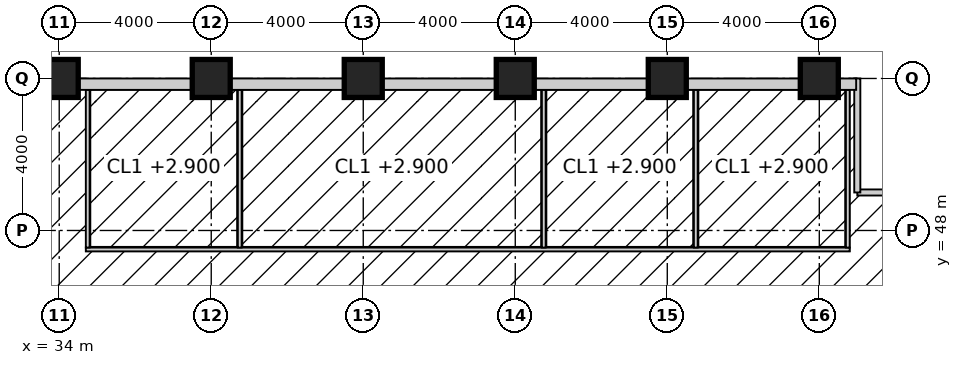
"""IFC4 building model, lengths in metres.
Left out: names, types, materials, properties, quantities, classifications, styles, units other than length and angle.
Written with IfcOpenShell. Run it as: python <this file> out.ifc"""

import sys

from ifc_helpers import new_model, si_unit, direction, frame, frame_2d, origin, origin_2d, place, context, subcontext, project, spatial, rectangle, hollow_rectangle, extrude, element, fill, save


model = new_model("IFC4")
c1 = context("Model", 3, precision=1e-05, world=origin(), true_north=direction((0.0, 1.0)))
c2 = subcontext(c1, "Body", "Model", "MODEL_VIEW")
j1 = project(units=[si_unit("LENGTHUNIT", "METRE"), si_unit("PLANEANGLEUNIT", "RADIAN")], contexts=[c1])
p1 = place(None, origin())
s1 = spatial("IfcSite", under=j1, at=p1, CompositionType="ELEMENT")
p2 = place(p1, origin())
s2 = spatial("IfcBuilding", under=s1, at=p2, CompositionType="ELEMENT")
p3 = place(p2, frame((0.0, 0.0, 113.4)))
s3 = spatial("IfcBuildingStorey", under=s2, at=p3, CompositionType="ELEMENT", Elevation=113.4)
for number, where, z_axis, x_axis in (
    (1, (34.0, 52.0, 0.0), (0.0, 0.0, 1.0), (1.0, 0.0, 0.0)),
    (2, (38.0, 52.0, 0.0), (0.0, 0.0, 1.0), (1.0, 0.0, 0.0)),
    (3, (42.0, 52.0, 0.0), (0.0, 0.0, 1.0), (1.0, 0.0, 0.0)),
    (4, (46.0, 52.0, 0.0), (0.0, 0.0, 1.0), (1.0, 0.0, 0.0)),
    (5, (50.0, 52.0, 0.0), (0.0, 0.0, 1.0), (1.0, 0.0, 0.0)),
    (6, (54.0, 52.0, 0.0), (0.0, 0.0, 1.0), (1.0, 0.0, 0.0)),
):
    element("IfcColumn", number, at=place(p3, frame(where, z_axis=z_axis, x_axis=x_axis)), inside=s3, PredefinedType="COLUMN", context=c2, shape_type="SweptSolid", body=[
        extrude(hollow_rectangle(XDim=1.0, YDim=1.0, WallThickness=0.1, at=origin_2d()), origin(), (0.0, 0.0, 1.0), 4.0),
    ])
p4 = place(p3, frame((34.7, 47.5, 0.0), z_axis=(0.0, 0.0, 1.0), x_axis=(1.0, 0.0, 0.0)))
e7 = element("IfcWall", 7, at=p4, inside=s3, PredefinedType="PARTITIONING", context=c2, shape_type="SweptSolid", body=[
    extrude(rectangle(XDim=20.1, YDim=0.1, at=frame_2d((10.05, 0.0))), origin(), (0.0, 0.0, 1.0), 3.85),
])
p5 = place(p4, frame((1.55, 0.0, 0.0)))
e8 = element("IfcOpeningElement", 8, at=p5, cuts=e7, PredefinedType="OPENING", context=c2, shape_type="SweptSolid", body=[
    extrude(rectangle(XDim=1.0, YDim=2.2, at=frame_2d((0.5, 1.1))), frame((0.0, 0.06, 0.0), z_axis=(0.0, -1.0, 0.0), x_axis=(1.0, 0.0, 0.0)), (0.0, 0.0, 1.0), 0.12),
])
p6 = place(p4, frame((7.55, 0.0, 0.0)))
e9 = element("IfcOpeningElement", 9, at=p6, cuts=e7, PredefinedType="OPENING", context=c2, shape_type="SweptSolid", body=[
    extrude(rectangle(XDim=1.0, YDim=2.2, at=frame_2d((0.5, 1.1))), frame((0.0, 0.06, 0.0), z_axis=(0.0, -1.0, 0.0), x_axis=(1.0, 0.0, 0.0)), (0.0, 0.0, 1.0), 0.12),
])
p7 = place(p4, frame((13.55, 0.0, 0.0)))
e10 = element("IfcOpeningElement", 10, at=p7, cuts=e7, PredefinedType="OPENING", context=c2, shape_type="SweptSolid", body=[
    extrude(rectangle(XDim=1.0, YDim=2.2, at=frame_2d((0.5, 1.1))), frame((0.0, 0.06, 0.0), z_axis=(0.0, -1.0, 0.0), x_axis=(1.0, 0.0, 0.0)), (0.0, 0.0, 1.0), 0.12),
])
p8 = place(p4, frame((17.55, 0.0, 0.0)))
e11 = element("IfcOpeningElement", 11, at=p8, cuts=e7, PredefinedType="OPENING", context=c2, shape_type="SweptSolid", body=[
    extrude(rectangle(XDim=1.0, YDim=2.2, at=frame_2d((0.5, 1.1))), frame((0.0, 0.06, 0.0), z_axis=(0.0, -1.0, 0.0), x_axis=(1.0, 0.0, 0.0)), (0.0, 0.0, 1.0), 0.12),
])
for number, where, z_axis, x_axis in (
    (12, (34.75, 47.55, 0.0), (0.0, 0.0, 1.0), (0.0, 1.0, 0.0)),
    (13, (38.75, 47.55, 0.0), (0.0, 0.0, 1.0), (0.0, 1.0, 0.0)),
    (14, (46.75, 47.55, 0.0), (0.0, 0.0, 1.0), (0.0, 1.0, 0.0)),
    (15, (50.75, 47.55, 0.0), (0.0, 0.0, 1.0), (0.0, 1.0, 0.0)),
    (16, (54.75, 47.55, 0.0), (0.0, 0.0, 1.0), (0.0, 1.0, 0.0)),
):
    element("IfcWall", number, at=place(p3, frame(where, z_axis=z_axis, x_axis=x_axis)), inside=s3, PredefinedType="PARTITIONING", context=c2, shape_type="SweptSolid", body=[
        extrude(rectangle(XDim=4.15, YDim=0.1, at=frame_2d((2.075, 0.0))), origin(), (0.0, 0.0, 1.0), 3.85),
    ])
p9 = place(p3, frame((37.5, 51.85, 0.0), z_axis=(0.0, 0.0, 1.0), x_axis=(-1.0, 0.0, 0.0)))
e17 = element("IfcWall", 17, at=p9, inside=s3, PredefinedType="ELEMENTEDWALL", context=c2, shape_type="SweptSolid", body=[
    extrude(rectangle(XDim=3.0, YDim=0.3, at=frame_2d((1.5, 0.0))), origin(), (0.0, 0.0, 1.0), 2.85),
])
p10 = place(p9, frame((0.5, 0.0, 0.8)))
e18 = element("IfcOpeningElement", 18, at=p10, cuts=e17, PredefinedType="OPENING", context=c2, shape_type="SweptSolid", body=[
    extrude(rectangle(XDim=2.0, YDim=2.0, at=frame_2d((1.0, 1.0))), frame((0.0, 0.16, 0.0), z_axis=(0.0, -1.0, 0.0), x_axis=(1.0, 0.0, 0.0)), (0.0, 0.0, 1.0), 0.32),
])
p11 = place(p3, frame((41.5, 51.85, 0.0), z_axis=(0.0, 0.0, 1.0), x_axis=(-1.0, 0.0, 0.0)))
e19 = element("IfcWall", 19, at=p11, inside=s3, PredefinedType="ELEMENTEDWALL", context=c2, shape_type="SweptSolid", body=[
    extrude(rectangle(XDim=3.0, YDim=0.3, at=frame_2d((1.5, 0.0))), origin(), (0.0, 0.0, 1.0), 2.85),
])
p12 = place(p11, frame((0.5, 0.0, 0.8)))
e20 = element("IfcOpeningElement", 20, at=p12, cuts=e19, PredefinedType="OPENING", context=c2, shape_type="SweptSolid", body=[
    extrude(rectangle(XDim=2.0, YDim=2.0, at=frame_2d((1.0, 1.0))), frame((0.0, 0.16, 0.0), z_axis=(0.0, -1.0, 0.0), x_axis=(1.0, 0.0, 0.0)), (0.0, 0.0, 1.0), 0.32),
])
p13 = place(p3, frame((45.5, 51.85, 0.0), z_axis=(0.0, 0.0, 1.0), x_axis=(-1.0, 0.0, 0.0)))
e21 = element("IfcWall", 21, at=p13, inside=s3, PredefinedType="ELEMENTEDWALL", context=c2, shape_type="SweptSolid", body=[
    extrude(rectangle(XDim=3.0, YDim=0.3, at=frame_2d((1.5, 0.0))), origin(), (0.0, 0.0, 1.0), 2.85),
])
p14 = place(p13, frame((0.5, 0.0, 0.8)))
e22 = element("IfcOpeningElement", 22, at=p14, cuts=e21, PredefinedType="OPENING", context=c2, shape_type="SweptSolid", body=[
    extrude(rectangle(XDim=2.0, YDim=2.0, at=frame_2d((1.0, 1.0))), frame((0.0, 0.16, 0.0), z_axis=(0.0, -1.0, 0.0), x_axis=(1.0, 0.0, 0.0)), (0.0, 0.0, 1.0), 0.32),
])
p15 = place(p3, frame((49.5, 51.85, 0.0), z_axis=(0.0, 0.0, 1.0), x_axis=(-1.0, 0.0, 0.0)))
e23 = element("IfcWall", 23, at=p15, inside=s3, PredefinedType="ELEMENTEDWALL", context=c2, shape_type="SweptSolid", body=[
    extrude(rectangle(XDim=3.0, YDim=0.3, at=frame_2d((1.5, 0.0))), origin(), (0.0, 0.0, 1.0), 2.85),
])
p16 = place(p15, frame((0.5, 0.0, 0.8)))
e24 = element("IfcOpeningElement", 24, at=p16, cuts=e23, PredefinedType="OPENING", context=c2, shape_type="SweptSolid", body=[
    extrude(rectangle(XDim=2.0, YDim=2.0, at=frame_2d((1.0, 1.0))), frame((0.0, 0.16, 0.0), z_axis=(0.0, -1.0, 0.0), x_axis=(1.0, 0.0, 0.0)), (0.0, 0.0, 1.0), 0.32),
])
p17 = place(p3, frame((53.5, 51.85, 0.0), z_axis=(0.0, 0.0, 1.0), x_axis=(-1.0, 0.0, 0.0)))
e25 = element("IfcWall", 25, at=p17, inside=s3, PredefinedType="ELEMENTEDWALL", context=c2, shape_type="SweptSolid", body=[
    extrude(rectangle(XDim=3.0, YDim=0.3, at=frame_2d((1.5, 0.0))), origin(), (0.0, 0.0, 1.0), 2.85),
])
p18 = place(p17, frame((0.5, 0.0, 0.8)))
e26 = element("IfcOpeningElement", 26, at=p18, cuts=e25, PredefinedType="OPENING", context=c2, shape_type="SweptSolid", body=[
    extrude(rectangle(XDim=2.0, YDim=2.0, at=frame_2d((1.0, 1.0))), frame((0.0, 0.16, 0.0), z_axis=(0.0, -1.0, 0.0), x_axis=(1.0, 0.0, 0.0)), (0.0, 0.0, 1.0), 0.32),
])
p19 = place(p3, frame((54.97, 51.85, 0.0), z_axis=(0.0, 0.0, 1.0), x_axis=(-1.0, 0.0, 0.0)))
e27 = element("IfcWall", 27, at=p19, inside=s3, PredefinedType="ELEMENTEDWALL", context=c2, shape_type="SweptSolid", body=[
    extrude(rectangle(XDim=0.47, YDim=0.3, at=frame_2d((0.235, 0.0))), origin(), (0.0, 0.0, 1.0), 2.95),
])
p20 = place(p5, origin())
e28 = element("IfcDoor", 28, at=p20, inside=s3, OperationType="SINGLE_SWING_LEFT", PredefinedType="DOOR", context=c2, shape_type="SweptSolid", body=[
    extrude(rectangle(XDim=1.0, YDim=2.2, at=frame_2d((0.5, 1.1))), frame((0.0, 0.025, 0.0), z_axis=(0.0, -1.0, 0.0), x_axis=(1.0, 0.0, 0.0)), (0.0, 0.0, 1.0), 0.05),
])
fill(e8, e28)
p21 = place(p6, origin())
e29 = element("IfcDoor", 29, at=p21, inside=s3, OperationType="SINGLE_SWING_LEFT", PredefinedType="DOOR", context=c2, shape_type="SweptSolid", body=[
    extrude(rectangle(XDim=1.0, YDim=2.2, at=frame_2d((0.5, 1.1))), frame((0.0, 0.025, 0.0), z_axis=(0.0, -1.0, 0.0), x_axis=(1.0, 0.0, 0.0)), (0.0, 0.0, 1.0), 0.05),
])
fill(e9, e29)
p22 = place(p7, origin())
e30 = element("IfcDoor", 30, at=p22, inside=s3, OperationType="SINGLE_SWING_LEFT", PredefinedType="DOOR", context=c2, shape_type="SweptSolid", body=[
    extrude(rectangle(XDim=1.0, YDim=2.2, at=frame_2d((0.5, 1.1))), frame((0.0, 0.025, 0.0), z_axis=(0.0, -1.0, 0.0), x_axis=(1.0, 0.0, 0.0)), (0.0, 0.0, 1.0), 0.05),
])
fill(e10, e30)
p23 = place(p8, origin())
e31 = element("IfcDoor", 31, at=p23, inside=s3, OperationType="SINGLE_SWING_LEFT", PredefinedType="DOOR", context=c2, shape_type="SweptSolid", body=[
    extrude(rectangle(XDim=1.0, YDim=2.2, at=frame_2d((0.5, 1.1))), frame((0.0, 0.025, 0.0), z_axis=(0.0, -1.0, 0.0), x_axis=(1.0, 0.0, 0.0)), (0.0, 0.0, 1.0), 0.05),
])
fill(e11, e31)
p24 = place(p10, origin())
e32 = element("IfcWindow", 32, at=p24, inside=s3, PartitioningType="SINGLE_PANEL", PredefinedType="WINDOW", context=c2, shape_type="SweptSolid", body=[
    extrude(rectangle(XDim=2.0, YDim=2.0, at=frame_2d((1.0, 1.0))), frame((0.0, 0.03, 0.0), z_axis=(0.0, -1.0, 0.0), x_axis=(1.0, 0.0, 0.0)), (0.0, 0.0, 1.0), 0.06),
])
fill(e18, e32)
p25 = place(p12, origin())
e33 = element("IfcWindow", 33, at=p25, inside=s3, PartitioningType="SINGLE_PANEL", PredefinedType="WINDOW", context=c2, shape_type="SweptSolid", body=[
    extrude(rectangle(XDim=2.0, YDim=2.0, at=frame_2d((1.0, 1.0))), frame((0.0, 0.03, 0.0), z_axis=(0.0, -1.0, 0.0), x_axis=(1.0, 0.0, 0.0)), (0.0, 0.0, 1.0), 0.06),
])
fill(e20, e33)
p26 = place(p14, origin())
e34 = element("IfcWindow", 34, at=p26, inside=s3, PartitioningType="SINGLE_PANEL", PredefinedType="WINDOW", context=c2, shape_type="SweptSolid", body=[
    extrude(rectangle(XDim=2.0, YDim=2.0, at=frame_2d((1.0, 1.0))), frame((0.0, 0.03, 0.0), z_axis=(0.0, -1.0, 0.0), x_axis=(1.0, 0.0, 0.0)), (0.0, 0.0, 1.0), 0.06),
])
fill(e22, e34)
p27 = place(p16, origin())
e35 = element("IfcWindow", 35, at=p27, inside=s3, PartitioningType="SINGLE_PANEL", PredefinedType="WINDOW", context=c2, shape_type="SweptSolid", body=[
    extrude(rectangle(XDim=2.0, YDim=2.0, at=frame_2d((1.0, 1.0))), frame((0.0, 0.03, 0.0), z_axis=(0.0, -1.0, 0.0), x_axis=(1.0, 0.0, 0.0)), (0.0, 0.0, 1.0), 0.06),
])
fill(e24, e35)
p28 = place(p18, origin())
e36 = element("IfcWindow", 36, at=p28, inside=s3, PartitioningType="SINGLE_PANEL", PredefinedType="WINDOW", context=c2, shape_type="SweptSolid", body=[
    extrude(rectangle(XDim=2.0, YDim=2.0, at=frame_2d((1.0, 1.0))), frame((0.0, 0.03, 0.0), z_axis=(0.0, -1.0, 0.0), x_axis=(1.0, 0.0, 0.0)), (0.0, 0.0, 1.0), 0.06),
])
fill(e26, e36)
save(model, sys.argv[1])
